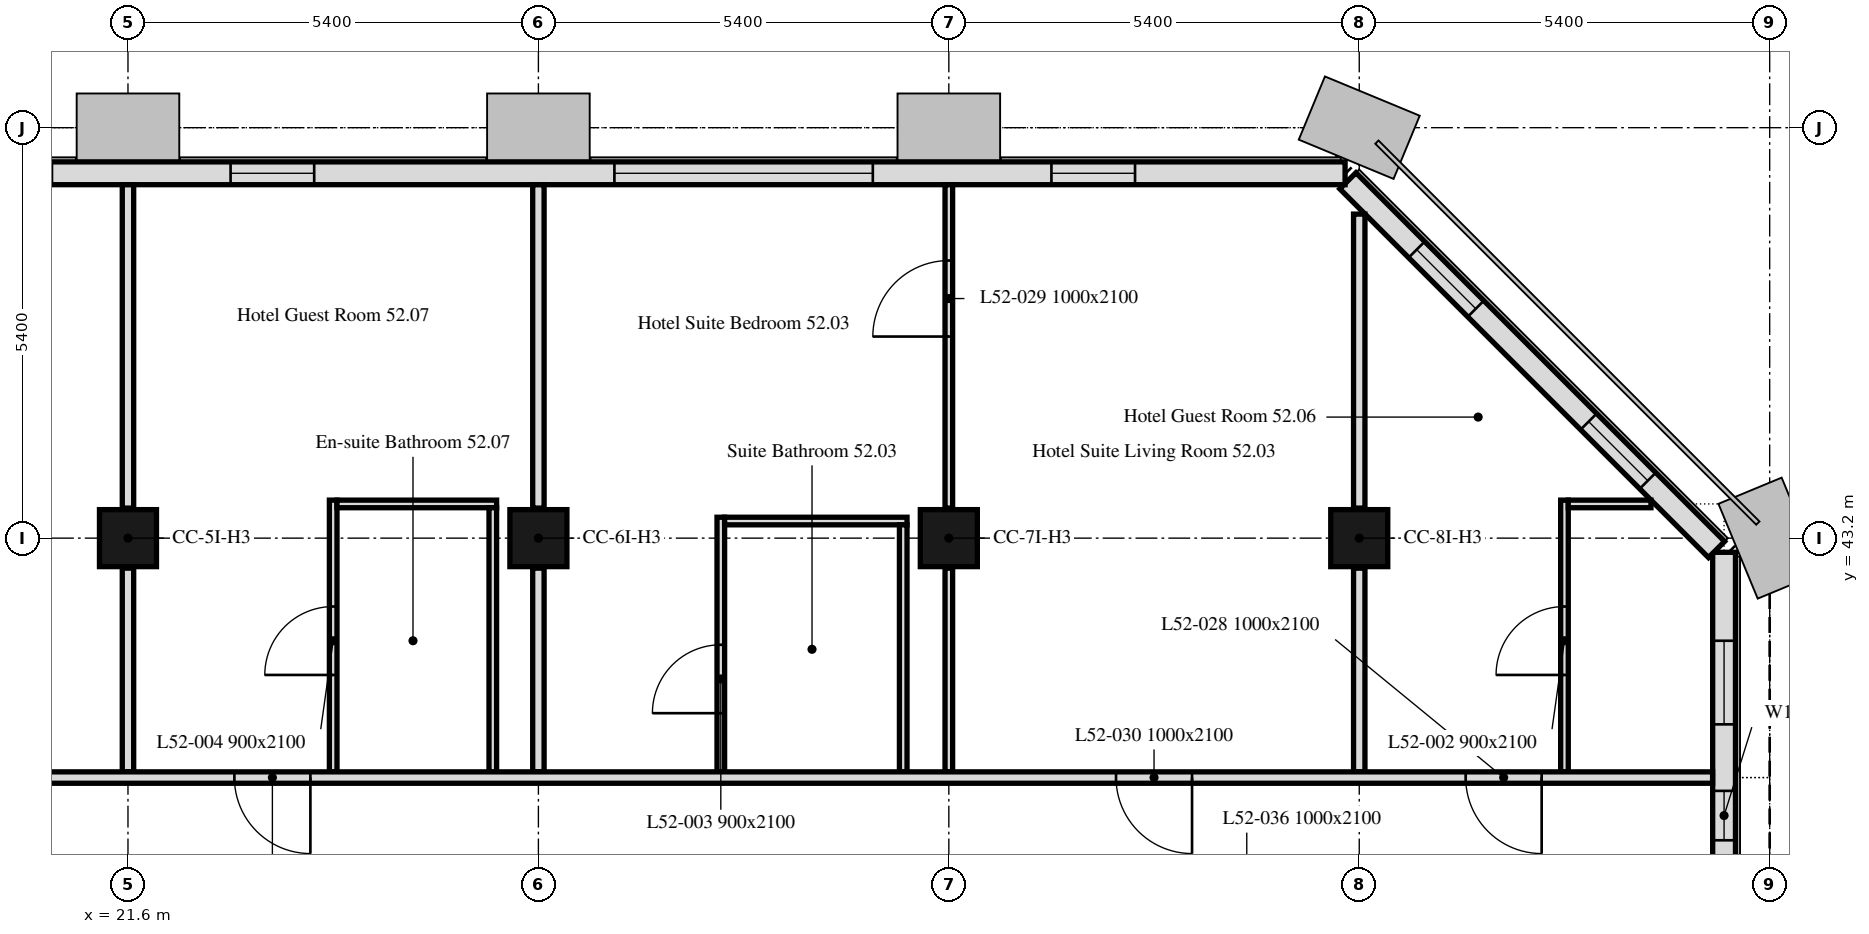
"""IFC4 building model, lengths in metres.
Left out: names, types, materials, properties, quantities, classifications, styles, units other than length and angle.
Written with IfcOpenShell. Run it as: python <this file> out.ifc"""

import sys

from ifc_helpers import new_model, si_unit, direction, frame, frame_2d, origin, origin_2d, place, context, subcontext, project, spatial, rectangle, extrude, element, fill, save


model = new_model("IFC4")
c1 = context("Model", 3, precision=1e-05, world=origin(), true_north=direction((0.0, 1.0)))
c2 = subcontext(c1, "Body", "Model", "MODEL_VIEW")
j1 = project(units=[si_unit("LENGTHUNIT", "METRE"), si_unit("PLANEANGLEUNIT", "RADIAN")], contexts=[c1])
p1 = place(None, origin())
s1 = spatial("IfcSite", under=j1, at=p1, CompositionType="ELEMENT")
p2 = place(p1, origin())
s2 = spatial("IfcBuilding", under=s1, at=p2, CompositionType="ELEMENT")
p3 = place(p2, frame((0.0, 0.0, 210.4)))
s3 = spatial("IfcBuildingStorey", under=s2, at=p3, CompositionType="ELEMENT", Elevation=210.4)
for number, where, z_axis, x_axis in (
    (1, (21.6, 43.2, 0.0), (0.0, 0.0, 1.0), (1.0, 0.0, 0.0)),
    (2, (27.0, 43.2, 0.0), (0.0, 0.0, 1.0), (1.0, 0.0, 0.0)),
    (3, (32.4, 43.2, 0.0), (0.0, 0.0, 1.0), (1.0, 0.0, 0.0)),
    (4, (37.8, 43.2, 0.0), (0.0, 0.0, 1.0), (1.0, 0.0, 0.0)),
):
    element("IfcColumn", number, at=place(p3, frame(where, z_axis=z_axis, x_axis=x_axis)), inside=s3, PredefinedType="COLUMN", context=c2, shape_type="SweptSolid", body=[
        extrude(rectangle(XDim=0.75, YDim=0.75, at=origin_2d()), origin(), (0.0, 0.0, 1.0), 3.0),
    ])
p4 = place(p3, frame((42.6, 32.4, 0.0), z_axis=(0.0, 0.0, 1.0), x_axis=(0.0, 1.0, 0.0)))
e5 = element("IfcWall", 5, at=p4, inside=s3, PredefinedType="SOLIDWALL", context=c2, shape_type="SweptSolid", body=[
    extrude(rectangle(XDim=10.614, YDim=0.3, at=frame_2d((5.307, 0.0))), origin(), (0.0, 0.0, 1.0), 3.0),
])
p5 = place(p4, frame((1.35, 0.0, 0.9)))
e6 = element("IfcOpeningElement", 6, at=p5, cuts=e5, PredefinedType="OPENING", context=c2, shape_type="SweptSolid", body=[
    extrude(rectangle(XDim=1.1, YDim=1.7, at=frame_2d((0.55, 0.85))), frame((0.0, 0.16, 0.0), z_axis=(0.0, -1.0, 0.0), x_axis=(1.0, 0.0, 0.0)), (0.0, 0.0, 1.0), 0.32),
])
p6 = place(p4, frame((2.95, 0.0, 0.9)))
e7 = element("IfcOpeningElement", 7, at=p6, cuts=e5, PredefinedType="OPENING", context=c2, shape_type="SweptSolid", body=[
    extrude(rectangle(XDim=1.1, YDim=1.7, at=frame_2d((0.55, 0.85))), frame((0.0, 0.16, 0.0), z_axis=(0.0, -1.0, 0.0), x_axis=(1.0, 0.0, 0.0)), (0.0, 0.0, 1.0), 0.32),
])
p7 = place(p4, frame((6.825, 0.0, 0.9)))
e8 = element("IfcOpeningElement", 8, at=p7, cuts=e5, PredefinedType="OPENING", context=c2, shape_type="SweptSolid", body=[
    extrude(rectangle(XDim=0.65, YDim=1.7, at=frame_2d((0.325, 0.85))), frame((0.0, 0.16, 0.0), z_axis=(0.0, -1.0, 0.0), x_axis=(1.0, 0.0, 0.0)), (0.0, 0.0, 1.0), 0.32),
])
p8 = place(p4, frame((8.35, 0.0, 0.9)))
e9 = element("IfcOpeningElement", 9, at=p8, cuts=e5, PredefinedType="OPENING", context=c2, shape_type="SweptSolid", body=[
    extrude(rectangle(XDim=1.1, YDim=1.7, at=frame_2d((0.55, 0.85))), frame((0.0, 0.16, 0.0), z_axis=(0.0, -1.0, 0.0), x_axis=(1.0, 0.0, 0.0)), (0.0, 0.0, 1.0), 0.32),
])
p9 = place(p3, frame((42.501, 43.051, 0.0), z_axis=(0.0, 0.0, 1.0), x_axis=(-0.707106781187, 0.707106781187, 0.0)))
e10 = element("IfcWall", 10, at=p9, inside=s3, PredefinedType="SOLIDWALL", context=c2, shape_type="SweptSolid", body=[
    extrude(rectangle(XDim=6.86, YDim=0.3, at=frame_2d((3.43, 0.0))), origin(), (0.0, 0.0, 1.0), 3.0),
])
p10 = place(p9, frame((1.28, 0.0, 0.9)))
e11 = element("IfcOpeningElement", 11, at=p10, cuts=e10, PredefinedType="OPENING", context=c2, shape_type="SweptSolid", body=[
    extrude(rectangle(XDim=1.1, YDim=1.7, at=frame_2d((0.55, 0.85))), frame((0.0, 0.16, 0.0), z_axis=(0.0, -1.0, 0.0), x_axis=(1.0, 0.0, 0.0)), (0.0, 0.0, 1.0), 0.32),
])
p11 = place(p9, frame((4.48, 0.0, 0.9)))
e12 = element("IfcOpeningElement", 12, at=p11, cuts=e10, PredefinedType="OPENING", context=c2, shape_type="SweptSolid", body=[
    extrude(rectangle(XDim=1.1, YDim=1.7, at=frame_2d((0.55, 0.85))), frame((0.0, 0.16, 0.0), z_axis=(0.0, -1.0, 0.0), x_axis=(1.0, 0.0, 0.0)), (0.0, 0.0, 1.0), 0.32),
])
p12 = place(p3, frame((37.614, 48.0, 0.0), z_axis=(0.0, 0.0, 1.0), x_axis=(-1.0, 0.0, 0.0)))
e13 = element("IfcWall", 13, at=p12, inside=s3, PredefinedType="SOLIDWALL", context=c2, shape_type="SweptSolid", body=[
    extrude(rectangle(XDim=32.027, YDim=0.3, at=frame_2d((16.014, 0.0))), origin(), (0.0, 0.0, 1.0), 3.0),
])
p13 = place(p12, frame((2.764, 0.0, 0.9)))
e14 = element("IfcOpeningElement", 14, at=p13, cuts=e13, PredefinedType="OPENING", context=c2, shape_type="SweptSolid", body=[
    extrude(rectangle(XDim=1.1, YDim=1.7, at=frame_2d((0.55, 0.85))), frame((0.0, 0.16, 0.0), z_axis=(0.0, -1.0, 0.0), x_axis=(1.0, 0.0, 0.0)), (0.0, 0.0, 1.0), 0.32),
])
p14 = place(p12, frame((6.214, 0.0, 0.9)))
e15 = element("IfcOpeningElement", 15, at=p14, cuts=e13, PredefinedType="OPENING", context=c2, shape_type="SweptSolid", body=[
    extrude(rectangle(XDim=3.4, YDim=1.7, at=frame_2d((1.7, 0.85))), frame((0.0, 0.16, 0.0), z_axis=(0.0, -1.0, 0.0), x_axis=(1.0, 0.0, 0.0)), (0.0, 0.0, 1.0), 0.32),
])
p15 = place(p12, frame((13.564, 0.0, 0.9)))
e16 = element("IfcOpeningElement", 16, at=p15, cuts=e13, PredefinedType="OPENING", context=c2, shape_type="SweptSolid", body=[
    extrude(rectangle(XDim=1.1, YDim=1.7, at=frame_2d((0.55, 0.85))), frame((0.0, 0.16, 0.0), z_axis=(0.0, -1.0, 0.0), x_axis=(1.0, 0.0, 0.0)), (0.0, 0.0, 1.0), 0.32),
])
p16 = place(p12, frame((17.014, 0.0, 0.9)))
e17 = element("IfcOpeningElement", 17, at=p16, cuts=e13, PredefinedType="OPENING", context=c2, shape_type="SweptSolid", body=[
    extrude(rectangle(XDim=3.4, YDim=1.7, at=frame_2d((1.7, 0.85))), frame((0.0, 0.16, 0.0), z_axis=(0.0, -1.0, 0.0), x_axis=(1.0, 0.0, 0.0)), (0.0, 0.0, 1.0), 0.32),
])
p17 = place(p12, frame((24.364, 0.0, 0.9)))
e18 = element("IfcOpeningElement", 18, at=p17, cuts=e13, PredefinedType="OPENING", context=c2, shape_type="SweptSolid", body=[
    extrude(rectangle(XDim=1.1, YDim=1.7, at=frame_2d((0.55, 0.85))), frame((0.0, 0.16, 0.0), z_axis=(0.0, -1.0, 0.0), x_axis=(1.0, 0.0, 0.0)), (0.0, 0.0, 1.0), 0.32),
])
p18 = place(p12, frame((27.814, 0.0, 0.9)))
e19 = element("IfcOpeningElement", 19, at=p18, cuts=e13, PredefinedType="OPENING", context=c2, shape_type="SweptSolid", body=[
    extrude(rectangle(XDim=3.4, YDim=1.7, at=frame_2d((1.7, 0.85))), frame((0.0, 0.16, 0.0), z_axis=(0.0, -1.0, 0.0), x_axis=(1.0, 0.0, 0.0)), (0.0, 0.0, 1.0), 0.32),
])
p19 = place(p3, frame((37.8, 47.463, 0.0), z_axis=(0.0, 0.0, 1.0), x_axis=(0.0, -1.0, 0.0)))
e20 = element("IfcWall", 20, at=p19, inside=s3, PredefinedType="PARTITIONING", context=c2, shape_type="SweptSolid", body=[
    extrude(rectangle(XDim=3.868, YDim=0.15, at=frame_2d((1.934, 0.0))), origin(), (0.0, 0.0, 1.0), 3.0),
])
p20 = place(p3, frame((37.8, 42.805, 0.0), z_axis=(0.0, 0.0, 1.0), x_axis=(0.0, -1.0, 0.0)))
e21 = element("IfcWall", 21, at=p20, inside=s3, PredefinedType="PARTITIONING", context=c2, shape_type="SweptSolid", body=[
    extrude(rectangle(XDim=2.68, YDim=0.15, at=frame_2d((1.34, 0.0))), origin(), (0.0, 0.0, 1.0), 3.0),
])
p21 = place(p3, frame((40.5, 40.125, 0.0), z_axis=(0.0, 0.0, 1.0), x_axis=(0.0, 1.0, 0.0)))
e22 = element("IfcWall", 22, at=p21, inside=s3, PredefinedType="PARTITIONING", context=c2, shape_type="SweptSolid", body=[
    extrude(rectangle(XDim=3.575, YDim=0.1, at=frame_2d((1.788, 0.0))), origin(), (0.0, 0.0, 1.0), 3.0),
])
p22 = place(p21, frame((1.275, 0.0, 0.0)))
e23 = element("IfcOpeningElement", 23, at=p22, cuts=e22, PredefinedType="OPENING", context=c2, shape_type="SweptSolid", body=[
    extrude(rectangle(XDim=0.9, YDim=2.1, at=frame_2d((0.45, 1.05))), frame((0.0, 0.05, 0.0), z_axis=(0.0, -1.0, 0.0), x_axis=(1.0, 0.0, 0.0)), (0.0, 0.0, 1.0), 0.1),
])
p23 = place(p3, frame((40.55, 43.65, 0.0), z_axis=(0.0, 0.0, 1.0), x_axis=(1.0, 0.0, 0.0)))
e24 = element("IfcWall", 24, at=p23, inside=s3, PredefinedType="PARTITIONING", context=c2, shape_type="SweptSolid", body=[
    extrude(rectangle(XDim=1.088, YDim=0.1, at=frame_2d((0.544, 0.0))), origin(), (0.0, 0.0, 1.0), 3.0),
])
p24 = place(p3, frame((27.0, 47.849, 0.0), z_axis=(0.0, 0.0, 1.0), x_axis=(0.0, -1.0, 0.0)))
e25 = element("IfcWall", 25, at=p24, inside=s3, PredefinedType="PARTITIONING", context=c2, shape_type="SweptSolid", body=[
    extrude(rectangle(XDim=4.254, YDim=0.15, at=frame_2d((2.127, 0.0))), origin(), (0.0, 0.0, 1.0), 2.4),
])
p25 = place(p3, frame((27.0, 42.805, 0.0), z_axis=(0.0, 0.0, 1.0), x_axis=(0.0, -1.0, 0.0)))
e26 = element("IfcWall", 26, at=p25, inside=s3, PredefinedType="PARTITIONING", context=c2, shape_type="SweptSolid", body=[
    extrude(rectangle(XDim=2.68, YDim=0.15, at=frame_2d((1.34, 0.0))), origin(), (0.0, 0.0, 1.0), 2.4),
])
p26 = place(p3, frame((29.4, 40.125, 0.0), z_axis=(0.0, 0.0, 1.0), x_axis=(0.0, 1.0, 0.0)))
e27 = element("IfcWall", 27, at=p26, inside=s3, PredefinedType="PARTITIONING", context=c2, shape_type="SweptSolid", body=[
    extrude(rectangle(XDim=3.35, YDim=0.1, at=frame_2d((1.675, 0.0))), origin(), (0.0, 0.0, 1.0), 3.0),
])
p27 = place(p26, frame((0.772, 0.0, 0.0)))
e28 = element("IfcOpeningElement", 28, at=p27, cuts=e27, PredefinedType="OPENING", context=c2, shape_type="SweptSolid", body=[
    extrude(rectangle(XDim=0.9, YDim=2.1, at=frame_2d((0.45, 1.05))), frame((0.0, 0.05, 0.0), z_axis=(0.0, -1.0, 0.0), x_axis=(1.0, 0.0, 0.0)), (0.0, 0.0, 1.0), 0.1),
])
p28 = place(p3, frame((29.45, 43.425, 0.0), z_axis=(0.0, 0.0, 1.0), x_axis=(1.0, 0.0, 0.0)))
e29 = element("IfcWall", 29, at=p28, inside=s3, PredefinedType="PARTITIONING", context=c2, shape_type="SweptSolid", body=[
    extrude(rectangle(XDim=2.4, YDim=0.1, at=frame_2d((1.2, 0.0))), origin(), (0.0, 0.0, 1.0), 3.0),
])
p29 = place(p3, frame((31.8, 43.375, 0.0), z_axis=(0.0, 0.0, 1.0), x_axis=(0.0, -1.0, 0.0)))
e30 = element("IfcWall", 30, at=p29, inside=s3, PredefinedType="PARTITIONING", context=c2, shape_type="SweptSolid", body=[
    extrude(rectangle(XDim=3.25, YDim=0.1, at=frame_2d((1.625, 0.0))), origin(), (0.0, 0.0, 1.0), 3.0),
])
p30 = place(p3, frame((32.4, 40.125, 0.0), z_axis=(0.0, 0.0, 1.0), x_axis=(0.0, 1.0, 0.0)))
e31 = element("IfcWall", 31, at=p30, inside=s3, PredefinedType="PARTITIONING", context=c2, shape_type="SweptSolid", body=[
    extrude(rectangle(XDim=2.68, YDim=0.1, at=frame_2d((1.34, 0.0))), origin(), (0.0, 0.0, 1.0), 2.4),
])
p31 = place(p3, frame((32.4, 43.595, 0.0), z_axis=(0.0, 0.0, 1.0), x_axis=(0.0, 1.0, 0.0)))
e32 = element("IfcWall", 32, at=p31, inside=s3, PredefinedType="PARTITIONING", context=c2, shape_type="SweptSolid", body=[
    extrude(rectangle(XDim=4.254, YDim=0.1, at=frame_2d((2.127, 0.0))), origin(), (0.0, 0.0, 1.0), 2.4),
])
p32 = place(p31, frame((2.257, 0.0, 0.0)))
e33 = element("IfcOpeningElement", 33, at=p32, cuts=e32, PredefinedType="OPENING", context=c2, shape_type="SweptSolid", body=[
    extrude(rectangle(XDim=1.0, YDim=2.1, at=frame_2d((0.5, 1.05))), frame((0.0, 0.05, 0.0), z_axis=(0.0, -1.0, 0.0), x_axis=(1.0, 0.0, 0.0)), (0.0, 0.0, 1.0), 0.1),
])
p33 = place(p3, frame((21.6, 47.849, 0.0), z_axis=(0.0, 0.0, 1.0), x_axis=(0.0, -1.0, 0.0)))
e34 = element("IfcWall", 34, at=p33, inside=s3, PredefinedType="PARTITIONING", context=c2, shape_type="SweptSolid", body=[
    extrude(rectangle(XDim=4.254, YDim=0.15, at=frame_2d((2.127, 0.0))), origin(), (0.0, 0.0, 1.0), 2.4),
])
p34 = place(p3, frame((21.6, 42.805, 0.0), z_axis=(0.0, 0.0, 1.0), x_axis=(0.0, -1.0, 0.0)))
e35 = element("IfcWall", 35, at=p34, inside=s3, PredefinedType="PARTITIONING", context=c2, shape_type="SweptSolid", body=[
    extrude(rectangle(XDim=2.68, YDim=0.15, at=frame_2d((1.34, 0.0))), origin(), (0.0, 0.0, 1.0), 2.4),
])
p35 = place(p3, frame((24.3, 40.125, 0.0), z_axis=(0.0, 0.0, 1.0), x_axis=(0.0, 1.0, 0.0)))
e36 = element("IfcWall", 36, at=p35, inside=s3, PredefinedType="PARTITIONING", context=c2, shape_type="SweptSolid", body=[
    extrude(rectangle(XDim=3.575, YDim=0.1, at=frame_2d((1.788, 0.0))), origin(), (0.0, 0.0, 1.0), 3.0),
])
p36 = place(p35, frame((1.275, 0.0, 0.0)))
e37 = element("IfcOpeningElement", 37, at=p36, cuts=e36, PredefinedType="OPENING", context=c2, shape_type="SweptSolid", body=[
    extrude(rectangle(XDim=0.9, YDim=2.1, at=frame_2d((0.45, 1.05))), frame((0.0, 0.05, 0.0), z_axis=(0.0, -1.0, 0.0), x_axis=(1.0, 0.0, 0.0)), (0.0, 0.0, 1.0), 0.1),
])
p37 = place(p3, frame((24.35, 43.65, 0.0), z_axis=(0.0, 0.0, 1.0), x_axis=(1.0, 0.0, 0.0)))
e38 = element("IfcWall", 38, at=p37, inside=s3, PredefinedType="PARTITIONING", context=c2, shape_type="SweptSolid", body=[
    extrude(rectangle(XDim=2.1, YDim=0.1, at=frame_2d((1.05, 0.0))), origin(), (0.0, 0.0, 1.0), 3.0),
])
p38 = place(p3, frame((26.4, 43.6, 0.0), z_axis=(0.0, 0.0, 1.0), x_axis=(0.0, -1.0, 0.0)))
e39 = element("IfcWall", 39, at=p38, inside=s3, PredefinedType="PARTITIONING", context=c2, shape_type="SweptSolid", body=[
    extrude(rectangle(XDim=3.475, YDim=0.1, at=frame_2d((1.738, 0.0))), origin(), (0.0, 0.0, 1.0), 3.0),
])
p39 = place(p3, frame((42.449, 40.05, 0.0), z_axis=(0.0, 0.0, 1.0), x_axis=(-1.0, 0.0, 0.0)))
e40 = element("IfcWall", 40, at=p39, inside=s3, PredefinedType="PARTITIONING", context=c2, shape_type="SweptSolid", body=[
    extrude(rectangle(XDim=41.698, YDim=0.15, at=frame_2d((20.849, 0.0))), origin(), (0.0, 0.0, 1.0), 2.4),
])
p40 = place(p39, frame((2.249, 0.0, 0.0)))
e41 = element("IfcOpeningElement", 41, at=p40, cuts=e40, PredefinedType="OPENING", context=c2, shape_type="SweptSolid", body=[
    extrude(rectangle(XDim=1.0, YDim=2.1, at=frame_2d((0.5, 1.05))), frame((0.0, 0.075, 0.0), z_axis=(0.0, -1.0, 0.0), x_axis=(1.0, 0.0, 0.0)), (0.0, 0.0, 1.0), 0.15),
])
p41 = place(p39, frame((6.849, 0.0, 0.0)))
e42 = element("IfcOpeningElement", 42, at=p41, cuts=e40, PredefinedType="OPENING", context=c2, shape_type="SweptSolid", body=[
    extrude(rectangle(XDim=1.0, YDim=2.1, at=frame_2d((0.5, 1.05))), frame((0.0, 0.075, 0.0), z_axis=(0.0, -1.0, 0.0), x_axis=(1.0, 0.0, 0.0)), (0.0, 0.0, 1.0), 0.15),
])
p42 = place(p39, frame((18.449, 0.0, 0.0)))
e43 = element("IfcOpeningElement", 43, at=p42, cuts=e40, PredefinedType="OPENING", context=c2, shape_type="SweptSolid", body=[
    extrude(rectangle(XDim=1.0, YDim=2.1, at=frame_2d((0.5, 1.05))), frame((0.0, 0.075, 0.0), z_axis=(0.0, -1.0, 0.0), x_axis=(1.0, 0.0, 0.0)), (0.0, 0.0, 1.0), 0.15),
])
p43 = place(p39, frame((23.049, 0.0, 0.0)))
e44 = element("IfcOpeningElement", 44, at=p43, cuts=e40, PredefinedType="OPENING", context=c2, shape_type="SweptSolid", body=[
    extrude(rectangle(XDim=1.0, YDim=2.1, at=frame_2d((0.5, 1.05))), frame((0.0, 0.075, 0.0), z_axis=(0.0, -1.0, 0.0), x_axis=(1.0, 0.0, 0.0)), (0.0, 0.0, 1.0), 0.15),
])
p44 = place(p39, frame((37.849, 0.0, 0.0)))
e45 = element("IfcOpeningElement", 45, at=p44, cuts=e40, PredefinedType="OPENING", context=c2, shape_type="SweptSolid", body=[
    extrude(rectangle(XDim=1.0, YDim=2.1, at=frame_2d((0.5, 1.05))), frame((0.0, 0.075, 0.0), z_axis=(0.0, -1.0, 0.0), x_axis=(1.0, 0.0, 0.0)), (0.0, 0.0, 1.0), 0.15),
])
p45 = place(p7, origin())
e46 = element("IfcWindow", 46, at=p45, inside=s3, PartitioningType="SINGLE_PANEL", PredefinedType="WINDOW", context=c2, shape_type="SweptSolid", body=[
    extrude(rectangle(XDim=0.65, YDim=1.7, at=frame_2d((0.325, 0.85))), frame((0.0, 0.03, 0.0), z_axis=(0.0, -1.0, 0.0), x_axis=(1.0, 0.0, 0.0)), (0.0, 0.0, 1.0), 0.06),
])
fill(e8, e46)
p46 = place(p8, origin())
e47 = element("IfcWindow", 47, at=p46, inside=s3, PartitioningType="SINGLE_PANEL", PredefinedType="WINDOW", context=c2, shape_type="SweptSolid", body=[
    extrude(rectangle(XDim=1.1, YDim=1.7, at=frame_2d((0.55, 0.85))), frame((0.0, 0.03, 0.0), z_axis=(0.0, -1.0, 0.0), x_axis=(1.0, 0.0, 0.0)), (0.0, 0.0, 1.0), 0.06),
])
fill(e9, e47)
p47 = place(p10, origin())
e48 = element("IfcWindow", 48, at=p47, inside=s3, PartitioningType="SINGLE_PANEL", PredefinedType="WINDOW", context=c2, shape_type="SweptSolid", body=[
    extrude(rectangle(XDim=1.1, YDim=1.7, at=frame_2d((0.55, 0.85))), frame((0.0, 0.03, 0.0), z_axis=(0.0, -1.0, 0.0), x_axis=(1.0, 0.0, 0.0)), (0.0, 0.0, 1.0), 0.06),
])
fill(e11, e48)
p48 = place(p11, origin())
e49 = element("IfcWindow", 49, at=p48, inside=s3, PartitioningType="SINGLE_PANEL", PredefinedType="WINDOW", context=c2, shape_type="SweptSolid", body=[
    extrude(rectangle(XDim=1.1, YDim=1.7, at=frame_2d((0.55, 0.85))), frame((0.0, 0.03, 0.0), z_axis=(0.0, -1.0, 0.0), x_axis=(1.0, 0.0, 0.0)), (0.0, 0.0, 1.0), 0.06),
])
fill(e12, e49)
p49 = place(p13, origin())
e50 = element("IfcWindow", 50, at=p49, inside=s3, PartitioningType="SINGLE_PANEL", PredefinedType="WINDOW", context=c2, shape_type="SweptSolid", body=[
    extrude(rectangle(XDim=1.1, YDim=1.7, at=frame_2d((0.55, 0.85))), frame((0.0, 0.03, 0.0), z_axis=(0.0, -1.0, 0.0), x_axis=(1.0, 0.0, 0.0)), (0.0, 0.0, 1.0), 0.06),
])
fill(e14, e50)
p50 = place(p14, origin())
e51 = element("IfcWindow", 51, at=p50, inside=s3, PartitioningType="SINGLE_PANEL", PredefinedType="WINDOW", context=c2, shape_type="SweptSolid", body=[
    extrude(rectangle(XDim=3.4, YDim=1.7, at=frame_2d((1.7, 0.85))), frame((0.0, 0.03, 0.0), z_axis=(0.0, -1.0, 0.0), x_axis=(1.0, 0.0, 0.0)), (0.0, 0.0, 1.0), 0.06),
])
fill(e15, e51)
p51 = place(p15, origin())
e52 = element("IfcWindow", 52, at=p51, inside=s3, PartitioningType="SINGLE_PANEL", PredefinedType="WINDOW", context=c2, shape_type="SweptSolid", body=[
    extrude(rectangle(XDim=1.1, YDim=1.7, at=frame_2d((0.55, 0.85))), frame((0.0, 0.03, 0.0), z_axis=(0.0, -1.0, 0.0), x_axis=(1.0, 0.0, 0.0)), (0.0, 0.0, 1.0), 0.06),
])
fill(e16, e52)
p52 = place(p22, origin())
e53 = element("IfcDoor", 53, at=p52, inside=s3, OperationType="SINGLE_SWING_LEFT", PredefinedType="DOOR", context=c2, shape_type="SweptSolid", body=[
    extrude(rectangle(XDim=0.9, YDim=2.1, at=frame_2d((0.45, 1.05))), frame((0.0, 0.025, 0.0), z_axis=(0.0, -1.0, 0.0), x_axis=(1.0, 0.0, 0.0)), (0.0, 0.0, 1.0), 0.05),
])
fill(e23, e53)
p53 = place(p27, origin())
e54 = element("IfcDoor", 54, at=p53, inside=s3, OperationType="SINGLE_SWING_LEFT", PredefinedType="DOOR", context=c2, shape_type="SweptSolid", body=[
    extrude(rectangle(XDim=0.9, YDim=2.1, at=frame_2d((0.45, 1.05))), frame((0.0, 0.025, 0.0), z_axis=(0.0, -1.0, 0.0), x_axis=(1.0, 0.0, 0.0)), (0.0, 0.0, 1.0), 0.05),
])
fill(e28, e54)
p54 = place(p36, origin())
e55 = element("IfcDoor", 55, at=p54, inside=s3, OperationType="SINGLE_SWING_RIGHT", PredefinedType="DOOR", context=c2, shape_type="SweptSolid", body=[
    extrude(rectangle(XDim=0.9, YDim=2.1, at=frame_2d((0.45, 1.05))), frame((0.0, 0.025, 0.0), z_axis=(0.0, -1.0, 0.0), x_axis=(1.0, 0.0, 0.0)), (0.0, 0.0, 1.0), 0.05),
])
fill(e37, e55)
p55 = place(p40, origin())
e56 = element("IfcDoor", 56, at=p55, inside=s3, OperationType="SINGLE_SWING_LEFT", PredefinedType="DOOR", context=c2, shape_type="SweptSolid", body=[
    extrude(rectangle(XDim=1.0, YDim=2.1, at=frame_2d((0.5, 1.05))), frame((0.0, 0.025, 0.0), z_axis=(0.0, -1.0, 0.0), x_axis=(1.0, 0.0, 0.0)), (0.0, 0.0, 1.0), 0.05),
])
fill(e41, e56)
p56 = place(p32, origin())
e57 = element("IfcDoor", 57, at=p56, inside=s3, OperationType="SINGLE_SWING_LEFT", PredefinedType="DOOR", context=c2, shape_type="SweptSolid", body=[
    extrude(rectangle(XDim=1.0, YDim=2.1, at=frame_2d((0.5, 1.05))), frame((0.0, 0.025, 0.0), z_axis=(0.0, -1.0, 0.0), x_axis=(1.0, 0.0, 0.0)), (0.0, 0.0, 1.0), 0.05),
])
fill(e33, e57)
p57 = place(p41, origin())
e58 = element("IfcDoor", 58, at=p57, inside=s3, OperationType="SINGLE_SWING_LEFT", PredefinedType="DOOR", context=c2, shape_type="SweptSolid", body=[
    extrude(rectangle(XDim=1.0, YDim=2.1, at=frame_2d((0.5, 1.05))), frame((0.0, 0.025, 0.0), z_axis=(0.0, -1.0, 0.0), x_axis=(1.0, 0.0, 0.0)), (0.0, 0.0, 1.0), 0.05),
])
fill(e42, e58)
p58 = place(p42, origin())
e59 = element("IfcDoor", 59, at=p58, inside=s3, OperationType="SINGLE_SWING_RIGHT", PredefinedType="DOOR", context=c2, shape_type="SweptSolid", body=[
    extrude(rectangle(XDim=1.0, YDim=2.1, at=frame_2d((0.5, 1.05))), frame((0.0, 0.025, 0.0), z_axis=(0.0, -1.0, 0.0), x_axis=(1.0, 0.0, 0.0)), (0.0, 0.0, 1.0), 0.05),
])
fill(e43, e59)
save(model, sys.argv[1])
